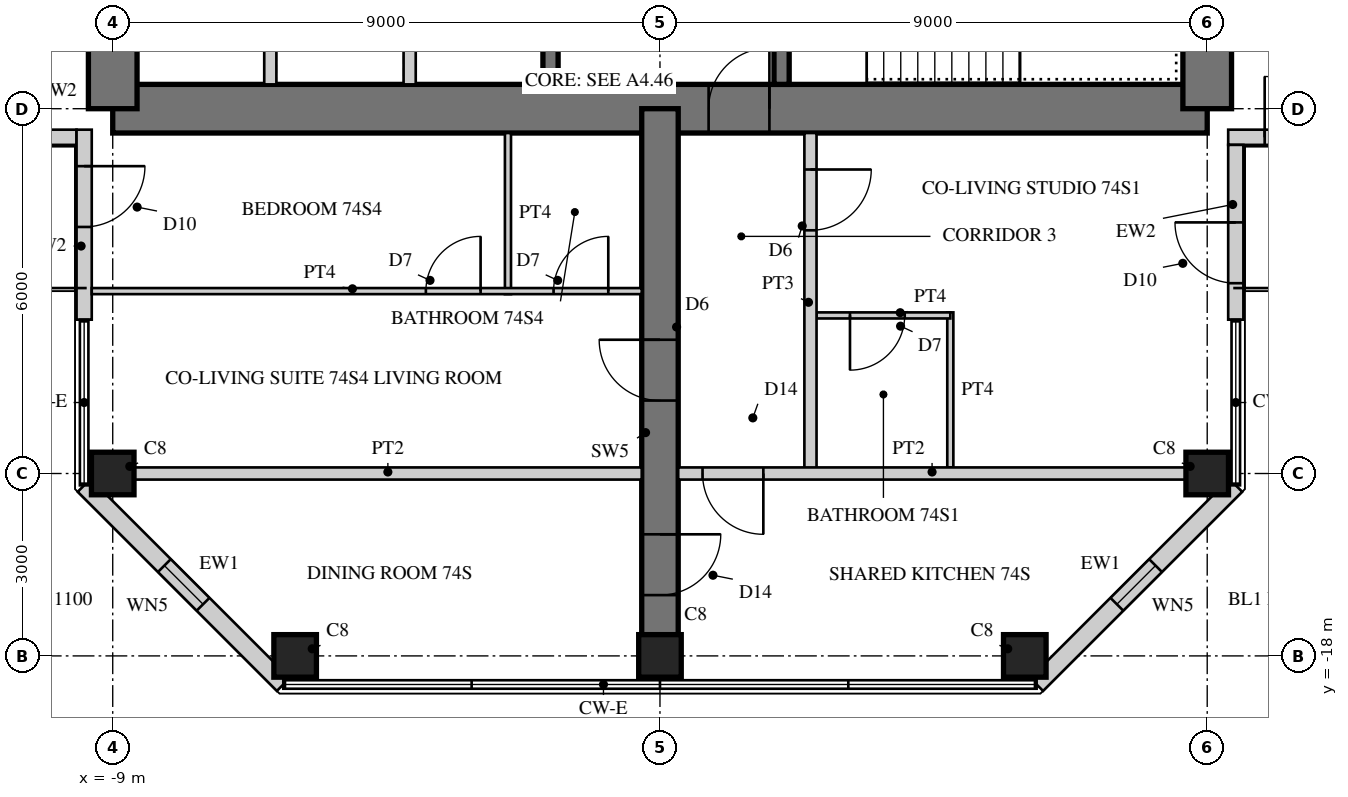
"""IFC4 building model, lengths in metres.
Left out: names, types, materials, properties, quantities, classifications, styles, units other than length and angle.
Written with IfcOpenShell. Run it as: python <this file> out.ifc"""

import sys

from ifc_helpers import new_model, si_unit, direction, frame, frame_2d, origin, origin_2d, place, context, subcontext, project, spatial, rectangle, hollow_rectangle, extrude, element, fill, save


model = new_model("IFC4")
c1 = context("Model", 3, precision=1e-05, world=origin(), true_north=direction((0.0, 1.0)))
c2 = subcontext(c1, "Body", "Model", "MODEL_VIEW")
j1 = project(units=[si_unit("LENGTHUNIT", "METRE"), si_unit("PLANEANGLEUNIT", "RADIAN")], contexts=[c1])
p1 = place(None, origin())
s1 = spatial("IfcSite", under=j1, at=p1, CompositionType="ELEMENT")
p2 = place(p1, origin())
s2 = spatial("IfcBuilding", under=s1, at=p2, CompositionType="ELEMENT")
p3 = place(p2, frame((0.0, 0.0, 284.9)))
s3 = spatial("IfcBuildingStorey", under=s2, at=p3, CompositionType="ELEMENT", Elevation=284.9)
p4 = place(p3, frame((-9.0, -9.0, 0.0), z_axis=(0.0, 0.0, 1.0), x_axis=(1.0, 0.0, 0.0)))
e1 = element("IfcWall", 1, at=p4, inside=s3, PredefinedType="SHEAR", context=c2, shape_type="SweptSolid", body=[
    extrude(rectangle(XDim=18.0, YDim=0.8, at=frame_2d((9.0, 0.0))), origin(), (0.0, 0.0, 1.0), 3.4),
])
p5 = place(p4, frame((9.8, 0.0, 0.0)))
e2 = element("IfcOpeningElement", 2, at=p5, cuts=e1, PredefinedType="OPENING", context=c2, shape_type="SweptSolid", body=[
    extrude(rectangle(XDim=1.0, YDim=2.4, at=frame_2d((0.5, 1.2))), frame((0.0, 0.41, 0.0), z_axis=(0.0, -1.0, 0.0), x_axis=(1.0, 0.0, 0.0)), (0.0, 0.0, 1.0), 0.82),
])
p6 = place(p3, frame((9.0, -9.0, 0.0), z_axis=(0.0, 0.0, 1.0), x_axis=(0.0, 1.0, 0.0)))
e3 = element("IfcWall", 3, at=p6, inside=s3, PredefinedType="SHEAR", context=c2, shape_type="SweptSolid", body=[
    extrude(rectangle(XDim=18.0, YDim=0.8, at=frame_2d((9.0, 0.0))), origin(), (0.0, 0.0, 1.0), 3.4),
])
p7 = place(p6, frame((9.8, 0.0, 0.0)))
e4 = element("IfcOpeningElement", 4, at=p7, cuts=e3, PredefinedType="OPENING", context=c2, shape_type="SweptSolid", body=[
    extrude(rectangle(XDim=1.0, YDim=2.4, at=frame_2d((0.5, 1.2))), frame((0.0, 0.41, 0.0), z_axis=(0.0, -1.0, 0.0), x_axis=(1.0, 0.0, 0.0)), (0.0, 0.0, 1.0), 0.82),
])
p8 = place(p3, frame((-9.0, 9.0, 0.0), z_axis=(0.0, 0.0, 1.0), x_axis=(0.0, -1.0, 0.0)))
e5 = element("IfcWall", 5, at=p8, inside=s3, PredefinedType="SHEAR", context=c2, shape_type="SweptSolid", body=[
    extrude(rectangle(XDim=18.0, YDim=0.8, at=frame_2d((9.0, 0.0))), origin(), (0.0, 0.0, 1.0), 3.4),
])
p9 = place(p8, frame((9.8, 0.0, 0.0)))
e6 = element("IfcOpeningElement", 6, at=p9, cuts=e5, PredefinedType="OPENING", context=c2, shape_type="SweptSolid", body=[
    extrude(rectangle(XDim=1.0, YDim=2.4, at=frame_2d((0.5, 1.2))), frame((0.0, 0.41, 0.0), z_axis=(0.0, -1.0, 0.0), x_axis=(1.0, 0.0, 0.0)), (0.0, 0.0, 1.0), 0.82),
])
p10 = place(p3, frame((-1.8, -1.875, 0.0), z_axis=(0.0, 0.0, 1.0), x_axis=(0.0, -1.0, 0.0)))
e7 = element("IfcWall", 7, at=p10, inside=s3, PredefinedType="SHEAR", context=c2, shape_type="SweptSolid", body=[
    extrude(rectangle(XDim=6.725, YDim=0.25, at=frame_2d((3.363, 0.0))), origin(), (0.0, 0.0, 1.0), 3.4),
])
p11 = place(p10, frame((1.875, 0.0, 0.0)))
e8 = element("IfcOpeningElement", 8, at=p11, cuts=e7, PredefinedType="OPENING", context=c2, shape_type="SweptSolid", body=[
    extrude(rectangle(XDim=1.6, YDim=2.4, at=frame_2d((0.8, 1.2))), frame((0.0, 0.135, 0.0), z_axis=(0.0, -1.0, 0.0), x_axis=(1.0, 0.0, 0.0)), (0.0, 0.0, 1.0), 0.27),
])
for number, where, z_axis, x_axis in (
    (9, (-4.117, -5.975, 0.0), (0.0, 0.0, 1.0), (0.0, -1.0, 0.0)),
    (10, (-6.408, -5.975, 0.0), (0.0, 0.0, 1.0), (0.0, -1.0, 0.0)),
):
    element("IfcWall", number, at=place(p3, frame(where, z_axis=z_axis, x_axis=x_axis)), inside=s3, PredefinedType="PARTITIONING", context=c2, shape_type="SweptSolid", body=[
        extrude(rectangle(XDim=2.625, YDim=0.2, at=frame_2d((1.312, 0.0))), origin(), (0.0, 0.0, 1.0), 3.4),
    ])
p12 = place(p3, frame((2.0, -1.675, 0.0), z_axis=(0.0, 0.0, 1.0), x_axis=(0.0, -1.0, 0.0)))
e11 = element("IfcWall", 11, at=p12, inside=s3, PredefinedType="SHEAR", context=c2, shape_type="SweptSolid", body=[
    extrude(rectangle(XDim=6.925, YDim=0.25, at=frame_2d((3.462, 0.0))), origin(), (0.0, 0.0, 1.0), 3.4),
])
p13 = place(p12, frame((0.725, 0.0, 0.0)))
e12 = element("IfcOpeningElement", 12, at=p13, cuts=e11, PredefinedType="OPENING", context=c2, shape_type="SweptSolid", body=[
    extrude(rectangle(XDim=1.0, YDim=2.1, at=frame_2d((0.5, 1.05))), frame((0.0, 0.135, 0.0), z_axis=(0.0, -1.0, 0.0), x_axis=(1.0, 0.0, 0.0)), (0.0, 0.0, 1.0), 0.27),
])
p14 = place(p3, frame((0.0, -9.0, 0.0), z_axis=(0.0, 0.0, 1.0), x_axis=(0.0, -1.0, 0.0)))
e13 = element("IfcWall", 13, at=p14, inside=s3, PredefinedType="SHEAR", context=c2, shape_type="SweptSolid", body=[
    extrude(rectangle(XDim=9.0, YDim=0.6, at=frame_2d((4.5, 0.0))), origin(), (0.0, 0.0, 1.0), 3.4),
])
p15 = place(p14, frame((3.8, 0.0, 0.0)))
e14 = element("IfcOpeningElement", 14, at=p15, cuts=e13, PredefinedType="OPENING", context=c2, shape_type="SweptSolid", body=[
    extrude(rectangle(XDim=1.0, YDim=2.15, at=frame_2d((0.5, 1.075))), frame((0.0, 0.31, 0.0), z_axis=(0.0, -1.0, 0.0), x_axis=(1.0, 0.0, 0.0)), (0.0, 0.0, 1.0), 0.62),
])
p16 = place(p14, frame((7.0, 0.0, 0.0)))
e15 = element("IfcOpeningElement", 15, at=p16, cuts=e13, PredefinedType="OPENING", context=c2, shape_type="SweptSolid", body=[
    extrude(rectangle(XDim=1.0, YDim=2.2, at=frame_2d((0.5, 1.1))), frame((0.0, 0.31, 0.0), z_axis=(0.0, -1.0, 0.0), x_axis=(1.0, 0.0, 0.0)), (0.0, 0.0, 1.0), 0.62),
])
for number, where, z_axis, x_axis in (
    (16, (-9.0, -15.0, 0.0), (0.0, 0.0, 1.0), (1.0, 0.0, 0.0)),
    (17, (9.0, -15.0, 0.0), (0.0, 0.0, 1.0), (1.0, 0.0, 0.0)),
    (18, (-6.0, -18.0, 0.0), (0.0, 0.0, 1.0), (1.0, 0.0, 0.0)),
    (19, (0.0, -18.0, 0.0), (0.0, 0.0, 1.0), (1.0, 0.0, 0.0)),
    (20, (6.0, -18.0, 0.0), (0.0, 0.0, 1.0), (1.0, 0.0, 0.0)),
):
    element("IfcColumn", number, at=place(p3, frame(where, z_axis=z_axis, x_axis=x_axis)), inside=s3, PredefinedType="COLUMN", context=c2, shape_type="SweptSolid", body=[
        extrude(rectangle(XDim=0.7, YDim=0.7, at=origin_2d()), origin(), (0.0, 0.0, 1.0), 3.4),
    ])
p17 = place(p3, frame((9.345, -9.47, 0.0), z_axis=(0.0, 0.0, 1.0), x_axis=(1.0, 0.0, 0.0)))
e21 = element("IfcWall", 21, at=p17, inside=s3, PredefinedType="SOLIDWALL", context=c2, shape_type="SweptSolid", body=[
    extrude(rectangle(XDim=3.125, YDim=0.25, at=frame_2d((1.562, 0.0))), origin(), (0.0, 0.0, 1.0), 3.2),
])
p18 = place(p17, frame((0.6, 0.0, 0.0)))
e22 = element("IfcOpeningElement", 22, at=p18, cuts=e21, PredefinedType="OPENING", context=c2, shape_type="SweptSolid", body=[
    extrude(rectangle(XDim=1.0, YDim=2.2, at=frame_2d((0.5, 1.1))), frame((0.0, 0.135, 0.0), z_axis=(0.0, -1.0, 0.0), x_axis=(1.0, 0.0, 0.0)), (0.0, 0.0, 1.0), 0.27),
])
p19 = place(p3, frame((-12.47, -9.47, 0.0), z_axis=(0.0, 0.0, 1.0), x_axis=(1.0, 0.0, 0.0)))
e23 = element("IfcWall", 23, at=p19, inside=s3, PredefinedType="SOLIDWALL", context=c2, shape_type="SweptSolid", body=[
    extrude(rectangle(XDim=2.875, YDim=0.25, at=frame_2d((1.438, 0.0))), origin(), (0.0, 0.0, 1.0), 3.2),
])
p20 = place(p19, frame((0.6, 0.0, 0.0)))
e24 = element("IfcOpeningElement", 24, at=p20, cuts=e23, PredefinedType="OPENING", context=c2, shape_type="SweptSolid", body=[
    extrude(rectangle(XDim=1.0, YDim=2.2, at=frame_2d((0.5, 1.1))), frame((0.0, 0.135, 0.0), z_axis=(0.0, -1.0, 0.0), x_axis=(1.0, 0.0, 0.0)), (0.0, 0.0, 1.0), 0.27),
])
p21 = place(p3, frame((-9.47, -9.345, 0.0), z_axis=(0.0, 0.0, 1.0), x_axis=(0.0, -1.0, 0.0)))
e25 = element("IfcWall", 25, at=p21, inside=s3, PredefinedType="SOLIDWALL", context=c2, shape_type="SweptSolid", body=[
    extrude(rectangle(XDim=3.125, YDim=0.25, at=frame_2d((1.562, 0.0))), origin(), (0.0, 0.0, 1.0), 3.2),
])
p22 = place(p21, frame((0.6, 0.0, 0.0)))
e26 = element("IfcOpeningElement", 26, at=p22, cuts=e25, PredefinedType="OPENING", context=c2, shape_type="SweptSolid", body=[
    extrude(rectangle(XDim=1.0, YDim=2.2, at=frame_2d((0.5, 1.1))), frame((0.0, 0.135, 0.0), z_axis=(0.0, -1.0, 0.0), x_axis=(1.0, 0.0, 0.0)), (0.0, 0.0, 1.0), 0.27),
])
p23 = place(p3, frame((-9.47, -15.195, 0.0), z_axis=(0.0, 0.0, 1.0), x_axis=(0.707106781187, -0.707106781187, 0.0)))
e27 = element("IfcWall", 27, at=p23, inside=s3, PredefinedType="SOLIDWALL", context=c2, shape_type="SweptSolid", body=[
    extrude(rectangle(XDim=4.632, YDim=0.3, at=frame_2d((2.316, 0.0))), origin(), (0.0, 0.0, 1.0), 3.2),
])
p24 = place(p23, frame((1.866, 0.0, 0.3)))
e28 = element("IfcOpeningElement", 28, at=p24, cuts=e27, PredefinedType="OPENING", context=c2, shape_type="SweptSolid", body=[
    extrude(rectangle(XDim=0.9, YDim=2.4, at=frame_2d((0.45, 1.2))), frame((0.0, 0.16, 0.0), z_axis=(0.0, -1.0, 0.0), x_axis=(1.0, 0.0, 0.0)), (0.0, 0.0, 1.0), 0.32),
])
p25 = place(p3, frame((6.195, -18.47, 0.0), z_axis=(0.0, 0.0, 1.0), x_axis=(0.707106781187, 0.707106781187, 0.0)))
e29 = element("IfcWall", 29, at=p25, inside=s3, PredefinedType="SOLIDWALL", context=c2, shape_type="SweptSolid", body=[
    extrude(rectangle(XDim=4.632, YDim=0.3, at=frame_2d((2.316, 0.0))), origin(), (0.0, 0.0, 1.0), 3.2),
])
p26 = place(p25, frame((1.866, 0.0, 0.3)))
e30 = element("IfcOpeningElement", 30, at=p26, cuts=e29, PredefinedType="OPENING", context=c2, shape_type="SweptSolid", body=[
    extrude(rectangle(XDim=0.9, YDim=2.4, at=frame_2d((0.45, 1.2))), frame((0.0, 0.16, 0.0), z_axis=(0.0, -1.0, 0.0), x_axis=(1.0, 0.0, 0.0)), (0.0, 0.0, 1.0), 0.32),
])
p27 = place(p3, frame((9.47, -12.47, 0.0), z_axis=(0.0, 0.0, 1.0), x_axis=(0.0, 1.0, 0.0)))
e31 = element("IfcWall", 31, at=p27, inside=s3, PredefinedType="SOLIDWALL", context=c2, shape_type="SweptSolid", body=[
    extrude(rectangle(XDim=2.875, YDim=0.25, at=frame_2d((1.438, 0.0))), origin(), (0.0, 0.0, 1.0), 3.2),
])
p28 = place(p27, frame((0.6, 0.0, 0.0)))
e32 = element("IfcOpeningElement", 32, at=p28, cuts=e31, PredefinedType="OPENING", context=c2, shape_type="SweptSolid", body=[
    extrude(rectangle(XDim=1.0, YDim=2.2, at=frame_2d((0.5, 1.1))), frame((0.0, 0.135, 0.0), z_axis=(0.0, -1.0, 0.0), x_axis=(1.0, 0.0, 0.0)), (0.0, 0.0, 1.0), 0.27),
])
p29 = place(p3, frame((4.775, -12.35, 0.0), z_axis=(0.0, 0.0, 1.0), x_axis=(0.0, -1.0, 0.0)))
e33 = element("IfcWall", 33, at=p29, inside=s3, PredefinedType="PARTITIONING", context=c2, shape_type="SweptSolid", body=[
    extrude(rectangle(XDim=2.55, YDim=0.1, at=frame_2d((1.275, 0.0))), origin(), (0.0, 0.0, 1.0), 3.2),
])
p30 = place(p3, frame((2.575, -12.4, 0.0), z_axis=(0.0, 0.0, 1.0), x_axis=(1.0, 0.0, 0.0)))
e34 = element("IfcWall", 34, at=p30, inside=s3, PredefinedType="PARTITIONING", context=c2, shape_type="SweptSolid", body=[
    extrude(rectangle(XDim=2.2, YDim=0.1, at=frame_2d((1.1, 0.0))), origin(), (0.0, 0.0, 1.0), 3.2),
])
p31 = place(p30, frame((0.55, 0.0, 0.0)))
e35 = element("IfcOpeningElement", 35, at=p31, cuts=e34, PredefinedType="OPENING", context=c2, shape_type="SweptSolid", body=[
    extrude(rectangle(XDim=0.9, YDim=2.1, at=frame_2d((0.45, 1.05))), frame((0.0, 0.06, 0.0), z_axis=(0.0, -1.0, 0.0), x_axis=(1.0, 0.0, 0.0)), (0.0, 0.0, 1.0), 0.12),
])
p32 = place(p3, frame((-2.5, -9.4, 0.0), z_axis=(0.0, 0.0, 1.0), x_axis=(0.0, -1.0, 0.0)))
e36 = element("IfcWall", 36, at=p32, inside=s3, PredefinedType="PARTITIONING", context=c2, shape_type="SweptSolid", body=[
    extrude(rectangle(XDim=2.65, YDim=0.1, at=frame_2d((1.325, 0.0))), origin(), (0.0, 0.0, 1.0), 3.2),
])
p33 = place(p3, frame((-9.345, -12.0, 0.0), z_axis=(0.0, 0.0, 1.0), x_axis=(1.0, 0.0, 0.0)))
e37 = element("IfcWall", 37, at=p33, inside=s3, PredefinedType="PARTITIONING", context=c2, shape_type="SweptSolid", body=[
    extrude(rectangle(XDim=9.045, YDim=0.1, at=frame_2d((4.522, 0.0))), origin(), (0.0, 0.0, 1.0), 3.2),
])
p34 = place(p33, frame((5.495, 0.0, 0.0)))
e38 = element("IfcOpeningElement", 38, at=p34, cuts=e37, PredefinedType="OPENING", context=c2, shape_type="SweptSolid", body=[
    extrude(rectangle(XDim=0.9, YDim=2.1, at=frame_2d((0.45, 1.05))), frame((0.0, 0.06, 0.0), z_axis=(0.0, -1.0, 0.0), x_axis=(1.0, 0.0, 0.0)), (0.0, 0.0, 1.0), 0.12),
])
p35 = place(p33, frame((7.595, 0.0, 0.0)))
e39 = element("IfcOpeningElement", 39, at=p35, cuts=e37, PredefinedType="OPENING", context=c2, shape_type="SweptSolid", body=[
    extrude(rectangle(XDim=0.9, YDim=2.1, at=frame_2d((0.45, 1.05))), frame((0.0, 0.06, 0.0), z_axis=(0.0, -1.0, 0.0), x_axis=(1.0, 0.0, 0.0)), (0.0, 0.0, 1.0), 0.12),
])
p36 = place(p3, frame((2.475, -9.4, 0.0), z_axis=(0.0, 0.0, 1.0), x_axis=(0.0, -1.0, 0.0)))
e40 = element("IfcWall", 40, at=p36, inside=s3, PredefinedType="SOLIDWALL", context=c2, shape_type="SweptSolid", body=[
    extrude(rectangle(XDim=5.6, YDim=0.2, at=frame_2d((2.8, 0.0))), origin(), (0.0, 0.0, 1.0), 3.2),
])
p37 = place(p36, frame((0.6, 0.0, 0.0)))
e41 = element("IfcOpeningElement", 41, at=p37, cuts=e40, PredefinedType="OPENING", context=c2, shape_type="SweptSolid", body=[
    extrude(rectangle(XDim=1.0, YDim=2.15, at=frame_2d((0.5, 1.075))), frame((0.0, 0.11, 0.0), z_axis=(0.0, -1.0, 0.0), x_axis=(1.0, 0.0, 0.0)), (0.0, 0.0, 1.0), 0.22),
])
p38 = place(p3, frame((-8.65, -15.0, 0.0), z_axis=(0.0, 0.0, 1.0), x_axis=(1.0, 0.0, 0.0)))
e42 = element("IfcWall", 42, at=p38, inside=s3, PredefinedType="SOLIDWALL", context=c2, shape_type="SweptSolid", body=[
    extrude(rectangle(XDim=8.35, YDim=0.2, at=frame_2d((4.175, 0.0))), origin(), (0.0, 0.0, 1.0), 2.5),
])
p39 = place(p3, frame((0.3, -15.0, 0.0), z_axis=(0.0, 0.0, 1.0), x_axis=(1.0, 0.0, 0.0)))
e43 = element("IfcWall", 43, at=p39, inside=s3, PredefinedType="SOLIDWALL", context=c2, shape_type="SweptSolid", body=[
    extrude(rectangle(XDim=8.35, YDim=0.2, at=frame_2d((4.175, 0.0))), origin(), (0.0, 0.0, 1.0), 2.5),
])
p40 = place(p39, frame((0.4, 0.0, 0.0)))
e44 = element("IfcOpeningElement", 44, at=p40, cuts=e43, PredefinedType="OPENING", context=c2, shape_type="SweptSolid", body=[
    extrude(rectangle(XDim=1.0, YDim=2.2, at=frame_2d((0.5, 1.1))), frame((0.0, 0.11, 0.0), z_axis=(0.0, -1.0, 0.0), x_axis=(1.0, 0.0, 0.0)), (0.0, 0.0, 1.0), 0.22),
])
p41 = place(p18, origin())
e45 = element("IfcDoor", 45, at=p41, inside=s3, OperationType="SINGLE_SWING_LEFT", PredefinedType="DOOR", context=c2, shape_type="SweptSolid", body=[
    extrude(hollow_rectangle(XDim=1.0, YDim=2.2, WallThickness=0.06, at=frame_2d((0.5, 1.1))), frame((0.0, 0.025, 0.0), z_axis=(0.0, -1.0, 0.0), x_axis=(1.0, 0.0, 0.0)), (0.0, 0.0, 1.0), 0.05),
    extrude(rectangle(XDim=0.879, YDim=2.079, at=frame_2d((0.5, 1.1))), frame((0.0, 0.025, 0.0), z_axis=(0.0, -1.0, 0.0), x_axis=(1.0, 0.0, 0.0)), (0.0, 0.0, 1.0), 0.05),
])
fill(e22, e45)
p42 = place(p22, origin())
e46 = element("IfcDoor", 46, at=p42, inside=s3, OperationType="SINGLE_SWING_LEFT", PredefinedType="DOOR", context=c2, shape_type="SweptSolid", body=[
    extrude(hollow_rectangle(XDim=1.0, YDim=2.2, WallThickness=0.06, at=frame_2d((0.5, 1.1))), frame((0.0, 0.025, 0.0), z_axis=(0.0, -1.0, 0.0), x_axis=(1.0, 0.0, 0.0)), (0.0, 0.0, 1.0), 0.05),
    extrude(rectangle(XDim=0.879, YDim=2.079, at=frame_2d((0.5, 1.1))), frame((0.0, 0.025, 0.0), z_axis=(0.0, -1.0, 0.0), x_axis=(1.0, 0.0, 0.0)), (0.0, 0.0, 1.0), 0.05),
])
fill(e26, e46)
p43 = place(p24, origin())
e47 = element("IfcWindow", 47, at=p43, inside=s3, PartitioningType="SINGLE_PANEL", PredefinedType="WINDOW", context=c2, shape_type="SweptSolid", body=[
    extrude(hollow_rectangle(XDim=0.9, YDim=2.4, WallThickness=0.06, at=frame_2d((0.45, 1.2))), frame((0.0, 0.03, 0.0), z_axis=(0.0, -1.0, 0.0), x_axis=(1.0, 0.0, 0.0)), (0.0, 0.0, 1.0), 0.06),
    extrude(rectangle(XDim=0.779, YDim=2.279, at=frame_2d((0.45, 1.2))), frame((0.0, 0.03, 0.0), z_axis=(0.0, -1.0, 0.0), x_axis=(1.0, 0.0, 0.0)), (0.0, 0.0, 1.0), 0.06),
])
fill(e28, e47)
p44 = place(p26, origin())
e48 = element("IfcWindow", 48, at=p44, inside=s3, PartitioningType="SINGLE_PANEL", PredefinedType="WINDOW", context=c2, shape_type="SweptSolid", body=[
    extrude(hollow_rectangle(XDim=0.9, YDim=2.4, WallThickness=0.06, at=frame_2d((0.45, 1.2))), frame((0.0, 0.03, 0.0), z_axis=(0.0, -1.0, 0.0), x_axis=(1.0, 0.0, 0.0)), (0.0, 0.0, 1.0), 0.06),
    extrude(rectangle(XDim=0.779, YDim=2.279, at=frame_2d((0.45, 1.2))), frame((0.0, 0.03, 0.0), z_axis=(0.0, -1.0, 0.0), x_axis=(1.0, 0.0, 0.0)), (0.0, 0.0, 1.0), 0.06),
])
fill(e30, e48)
p45 = place(p28, origin())
e49 = element("IfcDoor", 49, at=p45, inside=s3, OperationType="SINGLE_SWING_RIGHT", PredefinedType="DOOR", context=c2, shape_type="SweptSolid", body=[
    extrude(hollow_rectangle(XDim=1.0, YDim=2.2, WallThickness=0.06, at=frame_2d((0.5, 1.1))), frame((0.0, 0.025, 0.0), z_axis=(0.0, -1.0, 0.0), x_axis=(1.0, 0.0, 0.0)), (0.0, 0.0, 1.0), 0.05),
    extrude(rectangle(XDim=0.879, YDim=2.079, at=frame_2d((0.5, 1.1))), frame((0.0, 0.025, 0.0), z_axis=(0.0, -1.0, 0.0), x_axis=(1.0, 0.0, 0.0)), (0.0, 0.0, 1.0), 0.05),
])
fill(e32, e49)
p46 = place(p31, frame((0.9, 0.0, 0.0), z_axis=(0.0, 0.0, 1.0), x_axis=(-1.0, 0.0, 0.0)))
e50 = element("IfcDoor", 50, at=p46, inside=s3, OperationType="SINGLE_SWING_RIGHT", PredefinedType="DOOR", context=c2, shape_type="SweptSolid", body=[
    extrude(rectangle(XDim=0.9, YDim=2.1, at=frame_2d((0.45, 1.05))), frame((0.0, 0.025, 0.0), z_axis=(0.0, -1.0, 0.0), x_axis=(1.0, 0.0, 0.0)), (0.0, 0.0, 1.0), 0.05),
])
fill(e35, e50)
p47 = place(p34, origin())
e51 = element("IfcDoor", 51, at=p47, inside=s3, OperationType="SINGLE_SWING_RIGHT", PredefinedType="DOOR", context=c2, shape_type="SweptSolid", body=[
    extrude(rectangle(XDim=0.9, YDim=2.1, at=frame_2d((0.45, 1.05))), frame((0.0, 0.025, 0.0), z_axis=(0.0, -1.0, 0.0), x_axis=(1.0, 0.0, 0.0)), (0.0, 0.0, 1.0), 0.05),
])
fill(e38, e51)
p48 = place(p35, origin())
e52 = element("IfcDoor", 52, at=p48, inside=s3, OperationType="SINGLE_SWING_RIGHT", PredefinedType="DOOR", context=c2, shape_type="SweptSolid", body=[
    extrude(rectangle(XDim=0.9, YDim=2.1, at=frame_2d((0.45, 1.05))), frame((0.0, 0.025, 0.0), z_axis=(0.0, -1.0, 0.0), x_axis=(1.0, 0.0, 0.0)), (0.0, 0.0, 1.0), 0.05),
])
fill(e39, e52)
p49 = place(p37, origin())
e53 = element("IfcDoor", 53, at=p49, inside=s3, OperationType="SINGLE_SWING_LEFT", PredefinedType="DOOR", context=c2, shape_type="SweptSolid", body=[
    extrude(rectangle(XDim=1.0, YDim=2.15, at=frame_2d((0.5, 1.075))), frame((0.0, 0.025, 0.0), z_axis=(0.0, -1.0, 0.0), x_axis=(1.0, 0.0, 0.0)), (0.0, 0.0, 1.0), 0.05),
])
fill(e41, e53)
p50 = place(p40, frame((1.0, 0.0, 0.0), z_axis=(0.0, 0.0, 1.0), x_axis=(-1.0, 0.0, 0.0)))
e54 = element("IfcDoor", 54, at=p50, inside=s3, OperationType="SINGLE_SWING_LEFT", PredefinedType="DOOR", context=c2, shape_type="SweptSolid", body=[
    extrude(rectangle(XDim=1.0, YDim=2.2, at=frame_2d((0.5, 1.1))), frame((0.0, 0.025, 0.0), z_axis=(0.0, -1.0, 0.0), x_axis=(1.0, 0.0, 0.0)), (0.0, 0.0, 1.0), 0.05),
])
fill(e44, e54)
p51 = place(p15, frame((1.0, 0.0, 0.0), z_axis=(0.0, 0.0, 1.0), x_axis=(-1.0, 0.0, 0.0)))
e55 = element("IfcDoor", 55, at=p51, inside=s3, OperationType="SINGLE_SWING_RIGHT", PredefinedType="DOOR", context=c2, shape_type="SweptSolid", body=[
    extrude(rectangle(XDim=1.0, YDim=2.15, at=frame_2d((0.5, 1.075))), frame((0.0, 0.025, 0.0), z_axis=(0.0, -1.0, 0.0), x_axis=(1.0, 0.0, 0.0)), (0.0, 0.0, 1.0), 0.05),
])
fill(e14, e55)
p52 = place(p16, origin())
e56 = element("IfcDoor", 56, at=p52, inside=s3, OperationType="SINGLE_SWING_LEFT", PredefinedType="DOOR", context=c2, shape_type="SweptSolid", body=[
    extrude(rectangle(XDim=1.0, YDim=2.2, at=frame_2d((0.5, 1.1))), frame((0.0, 0.025, 0.0), z_axis=(0.0, -1.0, 0.0), x_axis=(1.0, 0.0, 0.0)), (0.0, 0.0, 1.0), 0.05),
])
fill(e15, e56)
p53 = place(p5, origin())
e57 = element("IfcDoor", 57, at=p53, inside=s3, OperationType="SINGLE_SWING_RIGHT", PredefinedType="DOOR", context=c2, shape_type="SweptSolid", body=[
    extrude(rectangle(XDim=1.0, YDim=2.4, at=frame_2d((0.5, 1.2))), frame((0.0, 0.055, 0.0), z_axis=(0.0, -1.0, 0.0), x_axis=(1.0, 0.0, 0.0)), (0.0, 0.0, 1.0), 0.05),
])
fill(e2, e57)
save(model, sys.argv[1])
